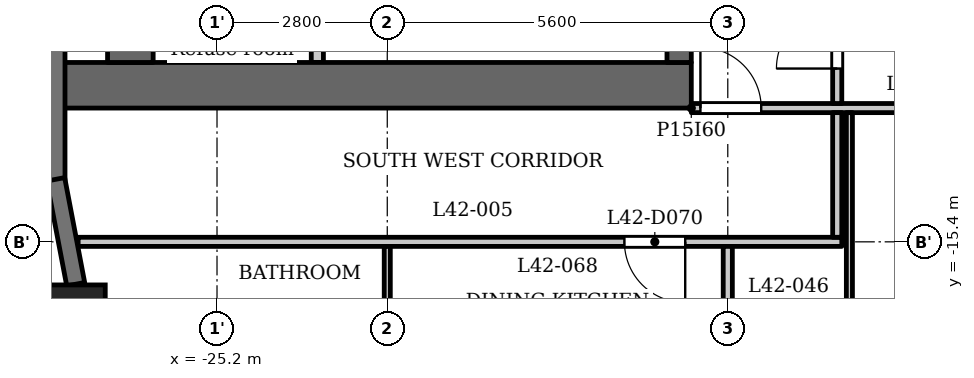
"""IFC4 building model, lengths in metres.
Left out: names, types, materials, properties, quantities, classifications, styles, units other than length and angle.
Written with IfcOpenShell. Run it as: python <this file> out.ifc"""

import sys

from ifc_helpers import new_model, si_unit, direction, frame, frame_2d, origin, origin_2d, place, context, subcontext, project, spatial, rectangle, extrude, element, fill, save


model = new_model("IFC4")
c1 = context("Model", 3, precision=1e-05, world=origin(), true_north=direction((0.0, 1.0)))
c2 = subcontext(c1, "Body", "Model", "MODEL_VIEW")
j1 = project(units=[si_unit("LENGTHUNIT", "METRE"), si_unit("PLANEANGLEUNIT", "RADIAN")], contexts=[c1])
p1 = place(None, origin())
s1 = spatial("IfcSite", under=j1, at=p1, CompositionType="ELEMENT")
p2 = place(p1, origin())
s2 = spatial("IfcBuilding", under=s1, at=p2, CompositionType="ELEMENT")
p3 = place(p2, frame((0.0, 0.0, 164.1)))
s3 = spatial("IfcBuildingStorey", under=s2, at=p3, CompositionType="ELEMENT", Elevation=164.1)
p4 = place(p3, frame((-27.538, -16.609, 0.0), z_axis=(0.0, 0.0, 1.0), x_axis=(1.0, 0.0, 0.0)))
e1 = element("IfcColumn", 1, at=p4, inside=s3, PredefinedType="COLUMN", context=c2, shape_type="SweptSolid", body=[
    extrude(rectangle(XDim=1.0, YDim=1.0, at=origin_2d()), origin(), (0.0, 0.0, 1.0), 3.5),
])
p5 = place(p3, frame((-27.85, -11.7, 0.0), z_axis=(0.0, 0.0, 1.0), x_axis=(0.0, -1.0, 0.0)))
e2 = element("IfcWall", 2, at=p5, inside=s3, PredefinedType="SOLIDWALL", context=c2, shape_type="SweptSolid", body=[
    extrude(rectangle(XDim=2.7, YDim=0.3, at=frame_2d((1.35, 0.0))), origin(), (0.0, 0.0, 1.0), 2.45),
])
p6 = place(p3, frame((-27.853, -14.372, 0.0), z_axis=(0.0, 0.0, 1.0), x_axis=(0.187259034321, -0.982310569049, 0.0)))
e3 = element("IfcWall", 3, at=p6, inside=s3, PredefinedType="SOLIDWALL", context=c2, shape_type="SweptSolid", body=[
    extrude(rectangle(XDim=1.756, YDim=0.3, at=frame_2d((0.878, 0.0))), origin(), (0.0, 0.0, 1.0), 2.45),
])
p7 = place(p3, frame((-17.4, -12.825, 0.0), z_axis=(0.0, 0.0, 1.0), x_axis=(-1.0, 0.0, 0.0)))
e4 = element("IfcWall", 4, at=p7, inside=s3, PredefinedType="SHEAR", context=c2, shape_type="SweptSolid", body=[
    extrude(rectangle(XDim=10.4, YDim=0.75, at=frame_2d((5.2, 0.0))), origin(), (0.0, 0.0, 1.0), 3.2),
])
p8 = place(p3, frame((-17.6, -12.45, 0.0), z_axis=(0.0, 0.0, 1.0), x_axis=(0.0, 1.0, 0.0)))
e5 = element("IfcWall", 5, at=p8, inside=s3, PredefinedType="SHEAR", context=c2, shape_type="SweptSolid", body=[
    extrude(rectangle(XDim=24.9, YDim=0.4, at=frame_2d((12.45, 0.0))), origin(), (0.0, 0.0, 1.0), 3.2),
])
p9 = place(p8, frame((8.65, 0.0, 0.0)))
e6 = element("IfcOpeningElement", 6, at=p9, cuts=e5, PredefinedType="OPENING", context=c2, shape_type="SweptSolid", body=[
    extrude(rectangle(XDim=0.9, YDim=2.1, at=frame_2d((0.45, 1.05))), frame((0.0, 0.21, 0.0), z_axis=(0.0, -1.0, 0.0), x_axis=(1.0, 0.0, 0.0)), (0.0, 0.0, 1.0), 0.42),
])
p10 = place(p8, frame((15.6, 0.0, 0.0)))
e7 = element("IfcOpeningElement", 7, at=p10, cuts=e5, PredefinedType="OPENING", context=c2, shape_type="SweptSolid", body=[
    extrude(rectangle(XDim=1.1, YDim=2.1, at=frame_2d((0.55, 1.05))), frame((0.0, 0.21, 0.0), z_axis=(0.0, -1.0, 0.0), x_axis=(1.0, 0.0, 0.0)), (0.0, 0.0, 1.0), 0.42),
])
p11 = place(p8, frame((18.0, 0.0, 0.0)))
e8 = element("IfcOpeningElement", 8, at=p11, cuts=e5, PredefinedType="OPENING", context=c2, shape_type="SweptSolid", body=[
    extrude(rectangle(XDim=1.1, YDim=2.1, at=frame_2d((0.55, 1.05))), frame((0.0, 0.21, 0.0), z_axis=(0.0, -1.0, 0.0), x_axis=(1.0, 0.0, 0.0)), (0.0, 0.0, 1.0), 0.42),
])
p12 = place(p8, frame((23.025, 0.0, 0.0)))
e9 = element("IfcOpeningElement", 9, at=p12, cuts=e5, PredefinedType="OPENING", context=c2, shape_type="SweptSolid", body=[
    extrude(rectangle(XDim=1.1, YDim=2.1, at=frame_2d((0.55, 1.05))), frame((0.0, 0.21, 0.0), z_axis=(0.0, -1.0, 0.0), x_axis=(1.0, 0.0, 0.0)), (0.0, 0.0, 1.0), 0.42),
])
p13 = place(p8, frame((0.775, 0.0, 0.0)))
e10 = element("IfcOpeningElement", 10, at=p13, cuts=e5, PredefinedType="OPENING", context=c2, shape_type="SweptSolid", body=[
    extrude(rectangle(XDim=1.1, YDim=2.1, at=frame_2d((0.55, 1.05))), frame((0.0, 0.21, 0.0), z_axis=(0.0, -1.0, 0.0), x_axis=(1.0, 0.0, 0.0)), (0.0, 0.0, 1.0), 0.42),
])
p14 = place(p8, frame((12.925, 0.0, 0.0)))
e11 = element("IfcOpeningElement", 11, at=p14, cuts=e5, PredefinedType="OPENING", context=c2, shape_type="SweptSolid", body=[
    extrude(rectangle(XDim=1.8, YDim=2.1, at=frame_2d((0.9, 1.05))), frame((0.0, 0.21, 0.0), z_axis=(0.0, -1.0, 0.0), x_axis=(1.0, 0.0, 0.0)), (0.0, 0.0, 1.0), 0.42),
])
p15 = place(p3, frame((-26.625, -12.45, 0.0), z_axis=(0.0, 0.0, 1.0), x_axis=(0.0, 1.0, 0.0)))
e12 = element("IfcWall", 12, at=p15, inside=s3, PredefinedType="SHEAR", context=c2, shape_type="SweptSolid", body=[
    extrude(rectangle(XDim=24.9, YDim=0.75, at=frame_2d((12.45, 0.0))), origin(), (0.0, 0.0, 1.0), 3.2),
])
p16 = place(p3, frame((-23.55, -12.45, 0.0), z_axis=(0.0, 0.0, 1.0), x_axis=(0.0, 1.0, 0.0)))
e13 = element("IfcWall", 13, at=p16, inside=s3, PredefinedType="PARTITIONING", context=c2, shape_type="SweptSolid", body=[
    extrude(rectangle(XDim=2.65, YDim=0.2, at=frame_2d((1.325, 0.0))), origin(), (0.0, 0.0, 1.0), 3.2),
])
p17 = place(p16, frame((0.875, 0.0, 0.0)))
e14 = element("IfcOpeningElement", 14, at=p17, cuts=e13, PredefinedType="OPENING", context=c2, shape_type="SweptSolid", body=[
    extrude(rectangle(XDim=0.9, YDim=2.1, at=frame_2d((0.45, 1.05))), frame((0.0, 0.11, 0.0), z_axis=(0.0, -1.0, 0.0), x_axis=(1.0, 0.0, 0.0)), (0.0, 0.0, 1.0), 0.22),
])
p18 = place(p3, frame((-27.484, -15.4, 0.0), z_axis=(0.0, 0.0, 1.0), x_axis=(1.0, 0.0, 0.0)))
e15 = element("IfcWall", 15, at=p18, inside=s3, PredefinedType="PARTITIONING", context=c2, shape_type="SweptSolid", body=[
    extrude(rectangle(XDim=12.559, YDim=0.15, at=frame_2d((6.279, 0.0))), origin(), (0.0, 0.0, 1.0), 3.2),
])
p19 = place(p18, frame((8.984, 0.0, 0.0)))
e16 = element("IfcOpeningElement", 16, at=p19, cuts=e15, PredefinedType="OPENING", context=c2, shape_type="SweptSolid", body=[
    extrude(rectangle(XDim=1.0, YDim=2.1, at=frame_2d((0.5, 1.05))), frame((0.0, 0.085, 0.0), z_axis=(0.0, -1.0, 0.0), x_axis=(1.0, 0.0, 0.0)), (0.0, 0.0, 1.0), 0.17),
])
p20 = place(p3, frame((-17.4, -13.2, 0.0), z_axis=(0.0, 0.0, 1.0), x_axis=(1.0, 0.0, 0.0)))
e17 = element("IfcWall", 17, at=p20, inside=s3, PredefinedType="PARTITIONING", context=c2, shape_type="SweptSolid", body=[
    extrude(rectangle(XDim=34.8, YDim=0.15, at=frame_2d((17.4, 0.0))), origin(), (0.0, 0.0, 1.0), 3.2),
])
p21 = place(p20, frame((0.15, 0.0, 0.0)))
e18 = element("IfcOpeningElement", 18, at=p21, cuts=e17, PredefinedType="OPENING", context=c2, shape_type="SweptSolid", body=[
    extrude(rectangle(XDim=1.0, YDim=2.1, at=frame_2d((0.5, 1.05))), frame((0.0, 0.085, 0.0), z_axis=(0.0, -1.0, 0.0), x_axis=(1.0, 0.0, 0.0)), (0.0, 0.0, 1.0), 0.17),
])
p22 = place(p20, frame((33.55, 0.0, 0.0)))
e19 = element("IfcOpeningElement", 19, at=p22, cuts=e17, PredefinedType="OPENING", context=c2, shape_type="SweptSolid", body=[
    extrude(rectangle(XDim=1.0, YDim=2.1, at=frame_2d((0.5, 1.05))), frame((0.0, 0.085, 0.0), z_axis=(0.0, -1.0, 0.0), x_axis=(1.0, 0.0, 0.0)), (0.0, 0.0, 1.0), 0.17),
])
p23 = place(p20, frame((3.5, 0.0, 0.0)))
e20 = element("IfcOpeningElement", 20, at=p23, cuts=e17, PredefinedType="OPENING", context=c2, shape_type="SweptSolid", body=[
    extrude(rectangle(XDim=1.0, YDim=2.1, at=frame_2d((0.5, 1.05))), frame((0.0, 0.085, 0.0), z_axis=(0.0, -1.0, 0.0), x_axis=(1.0, 0.0, 0.0)), (0.0, 0.0, 1.0), 0.17),
])
p24 = place(p20, frame((10.1, 0.0, 0.0)))
e21 = element("IfcOpeningElement", 21, at=p24, cuts=e17, PredefinedType="OPENING", context=c2, shape_type="SweptSolid", body=[
    extrude(rectangle(XDim=1.0, YDim=2.1, at=frame_2d((0.5, 1.05))), frame((0.0, 0.085, 0.0), z_axis=(0.0, -1.0, 0.0), x_axis=(1.0, 0.0, 0.0)), (0.0, 0.0, 1.0), 0.17),
])
p25 = place(p20, frame((15.7, 0.0, 0.0)))
e22 = element("IfcOpeningElement", 22, at=p25, cuts=e17, PredefinedType="OPENING", context=c2, shape_type="SweptSolid", body=[
    extrude(rectangle(XDim=1.0, YDim=2.1, at=frame_2d((0.5, 1.05))), frame((0.0, 0.085, 0.0), z_axis=(0.0, -1.0, 0.0), x_axis=(1.0, 0.0, 0.0)), (0.0, 0.0, 1.0), 0.17),
])
p26 = place(p20, frame((18.05, 0.0, 0.0)))
e23 = element("IfcOpeningElement", 23, at=p26, cuts=e17, PredefinedType="OPENING", context=c2, shape_type="SweptSolid", body=[
    extrude(rectangle(XDim=1.0, YDim=2.1, at=frame_2d((0.5, 1.05))), frame((0.0, 0.085, 0.0), z_axis=(0.0, -1.0, 0.0), x_axis=(1.0, 0.0, 0.0)), (0.0, 0.0, 1.0), 0.17),
])
p27 = place(p20, frame((26.9, 0.0, 0.0)))
e24 = element("IfcOpeningElement", 24, at=p27, cuts=e17, PredefinedType="OPENING", context=c2, shape_type="SweptSolid", body=[
    extrude(rectangle(XDim=1.0, YDim=2.1, at=frame_2d((0.5, 1.05))), frame((0.0, 0.085, 0.0), z_axis=(0.0, -1.0, 0.0), x_axis=(1.0, 0.0, 0.0)), (0.0, 0.0, 1.0), 0.17),
])
p28 = place(p3, frame((-22.4, -17.75, 0.0), z_axis=(0.0, 0.0, 1.0), x_axis=(0.0, 1.0, 0.0)))
e25 = element("IfcWall", 25, at=p28, inside=s3, PredefinedType="PARTITIONING", context=c2, shape_type="SweptSolid", body=[
    extrude(rectangle(XDim=2.275, YDim=0.1, at=frame_2d((1.137, 0.0))), origin(), (0.0, 0.0, 1.0), 3.2),
])
p29 = place(p3, frame((-16.8, -22.88, 0.0), z_axis=(0.0, 0.0, 1.0), x_axis=(0.0, 1.0, 0.0)))
e26 = element("IfcWall", 26, at=p29, inside=s3, PredefinedType="PARTITIONING", context=c2, shape_type="SweptSolid", body=[
    extrude(rectangle(XDim=7.405, YDim=0.15, at=frame_2d((3.702, 0.0))), origin(), (0.0, 0.0, 1.0), 3.2),
])
p30 = place(p3, frame((-15.0, -15.325, 0.0), z_axis=(0.0, 0.0, 1.0), x_axis=(0.0, 1.0, 0.0)))
e27 = element("IfcWall", 27, at=p30, inside=s3, PredefinedType="PARTITIONING", context=c2, shape_type="SweptSolid", body=[
    extrude(rectangle(XDim=2.05, YDim=0.15, at=frame_2d((1.025, 0.0))), origin(), (0.0, 0.0, 1.0), 3.2),
])
p31 = place(p3, frame((-15.0, -13.125, 0.0), z_axis=(0.0, 0.0, 1.0), x_axis=(0.0, 1.0, 0.0)))
e28 = element("IfcWall", 28, at=p31, inside=s3, PredefinedType="PARTITIONING", context=c2, shape_type="SweptSolid", body=[
    extrude(rectangle(XDim=6.356, YDim=0.15, at=frame_2d((3.178, 0.0))), origin(), (0.0, 0.0, 1.0), 3.2),
])
p32 = place(p31, frame((0.575, 0.0, 0.0)))
e29 = element("IfcOpeningElement", 29, at=p32, cuts=e28, PredefinedType="OPENING", context=c2, shape_type="SweptSolid", body=[
    extrude(rectangle(XDim=1.0, YDim=2.1, at=frame_2d((0.5, 1.05))), frame((0.0, 0.085, 0.0), z_axis=(0.0, -1.0, 0.0), x_axis=(1.0, 0.0, 0.0)), (0.0, 0.0, 1.0), 0.17),
])
p33 = place(p3, frame((-14.8, -17.05, 0.0), z_axis=(0.0, 0.0, 1.0), x_axis=(0.0, 1.0, 0.0)))
e30 = element("IfcWall", 30, at=p33, inside=s3, PredefinedType="PARTITIONING", context=c2, shape_type="SweptSolid", body=[
    extrude(rectangle(XDim=3.775, YDim=0.1, at=frame_2d((1.888, 0.0))), origin(), (0.0, 0.0, 1.0), 3.2),
])
p34 = place(p32, origin())
e31 = element("IfcDoor", 31, at=p34, inside=s3, OperationType="SINGLE_SWING_RIGHT", PredefinedType="DOOR", context=c2, shape_type="SweptSolid", body=[
    extrude(rectangle(XDim=1.0, YDim=2.1, at=frame_2d((0.5, 1.05))), frame((0.0, 0.025, 0.0), z_axis=(0.0, -1.0, 0.0), x_axis=(1.0, 0.0, 0.0)), (0.0, 0.0, 1.0), 0.05),
])
fill(e29, e31)
p35 = place(p21, origin())
e32 = element("IfcDoor", 32, at=p35, inside=s3, OperationType="SINGLE_SWING_RIGHT", PredefinedType="DOOR", context=c2, shape_type="SweptSolid", body=[
    extrude(rectangle(XDim=1.0, YDim=2.1, at=frame_2d((0.5, 1.05))), frame((0.0, 0.025, 0.0), z_axis=(0.0, -1.0, 0.0), x_axis=(1.0, 0.0, 0.0)), (0.0, 0.0, 1.0), 0.05),
])
fill(e18, e32)
p36 = place(p19, origin())
e33 = element("IfcDoor", 33, at=p36, inside=s3, OperationType="SINGLE_SWING_RIGHT", PredefinedType="DOOR", context=c2, shape_type="SweptSolid", body=[
    extrude(rectangle(XDim=1.0, YDim=2.1, at=frame_2d((0.5, 1.05))), frame((0.0, 0.025, 0.0), z_axis=(0.0, -1.0, 0.0), x_axis=(1.0, 0.0, 0.0)), (0.0, 0.0, 1.0), 0.05),
])
fill(e16, e33)
save(model, sys.argv[1])
